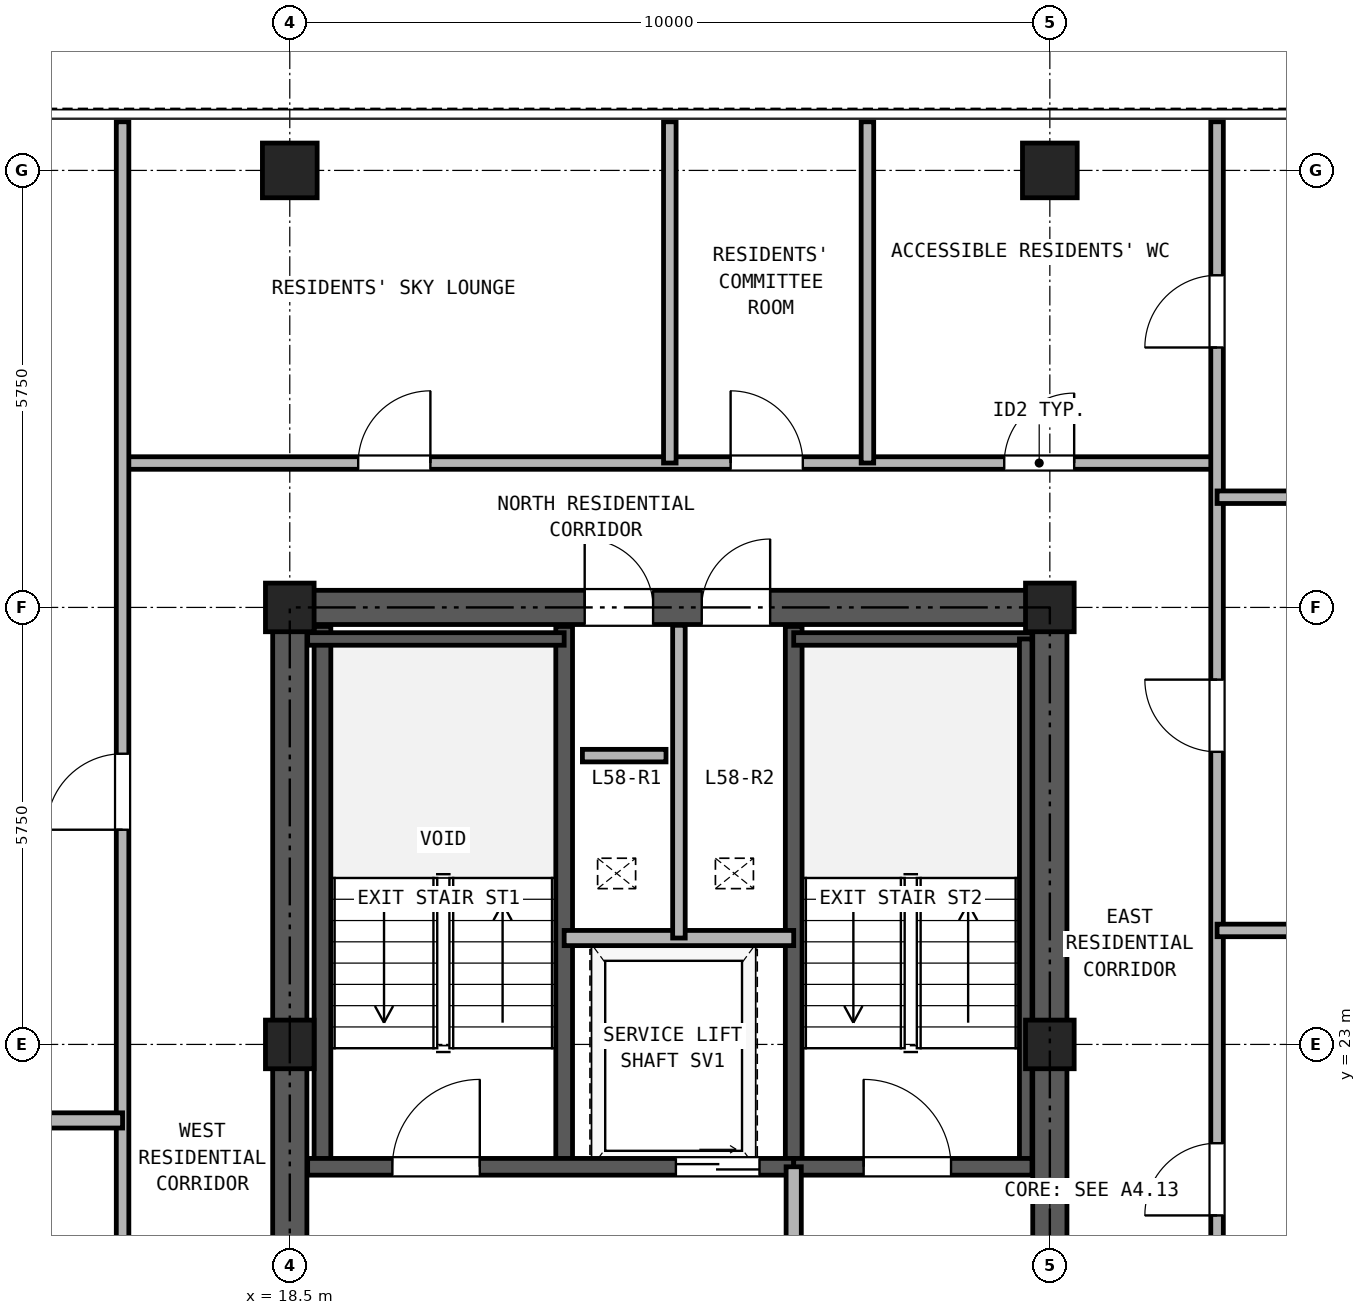
"""IFC4 building model, lengths in metres.
Left out: names, types, materials, properties, quantities, classifications, styles, units other than length and angle.
Written with IfcOpenShell. Run it as: python <this file> out.ifc"""

import sys

from ifc_helpers import new_model, si_unit, direction, frame, frame_2d, origin, origin_2d, place, context, subcontext, project, spatial, rectangle, hollow_rectangle, extrude, source, transform, mapped, element, fill, save


model = new_model("IFC4")
c1 = context("Model", 3, precision=1e-05, world=origin(), true_north=direction((0.0, 1.0)))
c2 = subcontext(c1, "Body", "Model", "MODEL_VIEW")
j1 = project(units=[si_unit("LENGTHUNIT", "METRE"), si_unit("PLANEANGLEUNIT", "RADIAN")], contexts=[c1])
p1 = place(None, origin())
s1 = spatial("IfcSite", under=j1, at=p1, CompositionType="ELEMENT")
p2 = place(p1, origin())
s2 = spatial("IfcBuilding", under=s1, at=p2, CompositionType="ELEMENT")
p3 = place(p2, frame((0.0, 0.0, 206.0)))
s3 = spatial("IfcBuildingStorey", under=s2, at=p3, CompositionType="ELEMENT", Elevation=206.0)
m1 = source(origin(), c2, "Body", "SweptSolid", [
    extrude(hollow_rectangle(XDim=0.72, YDim=0.72, WallThickness=0.04, at=origin_2d()), origin(), (0.0, 0.0, 1.0), 2.95),
])
for number, where, z_axis, x_axis in (
    (1, (18.5, 34.5, 0.0), (0.0, 0.0, 1.0), (1.0, 0.0, 0.0)),
    (2, (28.5, 34.5, 0.0), (0.0, 0.0, 1.0), (1.0, 0.0, 0.0)),
):
    element("IfcColumn", number, at=place(p3, frame(where, z_axis=z_axis, x_axis=x_axis)), inside=s3, PredefinedType="COLUMN", context=c2, shape_type="MappedRepresentation", body=[
        mapped(m1, transform((0.0, 0.0, 0.0), x_axis=(1.0, 0.0, 0.0), y_axis=(0.0, 1.0, 0.0), z_axis=(0.0, 0.0, 1.0), scale=1.0)),
    ])
m2 = source(origin(), c2, "Body", "SweptSolid", [
    extrude(hollow_rectangle(XDim=0.64, YDim=0.64, WallThickness=0.035, at=origin_2d()), origin(), (0.0, 0.0, 1.0), 2.95),
])
for number, where, z_axis, x_axis in (
    (3, (18.5, 23.0, 0.0), (0.0, 0.0, 1.0), (1.0, 0.0, 0.0)),
    (4, (18.5, 28.75, 0.0), (0.0, 0.0, 1.0), (1.0, 0.0, 0.0)),
    (5, (28.5, 23.0, 0.0), (0.0, 0.0, 1.0), (1.0, 0.0, 0.0)),
    (6, (28.5, 28.75, 0.0), (0.0, 0.0, 1.0), (1.0, 0.0, 0.0)),
):
    element("IfcColumn", number, at=place(p3, frame(where, z_axis=z_axis, x_axis=x_axis)), inside=s3, PredefinedType="COLUMN", context=c2, shape_type="MappedRepresentation", body=[
        mapped(m2, transform((0.0, 0.0, 0.0), x_axis=(1.0, 0.0, 0.0), y_axis=(0.0, 1.0, 0.0), z_axis=(0.0, 0.0, 1.0), scale=1.0)),
    ])
p4 = place(p3, frame((18.275, 28.75, 0.0), z_axis=(0.0, 0.0, 1.0), x_axis=(1.0, 0.0, 0.0)))
e7 = element("IfcWall", 7, at=p4, inside=s3, PredefinedType="SHEAR", context=c2, shape_type="SweptSolid", body=[
    extrude(rectangle(XDim=10.45, YDim=0.45, at=frame_2d((5.225, 0.0))), origin(), (0.0, 0.0, 1.0), 2.95),
])
p5 = place(p4, frame((4.105, 0.0, 0.0)))
e8 = element("IfcOpeningElement", 8, at=p5, cuts=e7, PredefinedType="OPENING", context=c2, shape_type="SweptSolid", body=[
    extrude(rectangle(XDim=0.9, YDim=2.05, at=frame_2d((0.45, 1.025))), frame((0.0, 0.235, 0.0), z_axis=(0.0, -1.0, 0.0), x_axis=(1.0, 0.0, 0.0)), (0.0, 0.0, 1.0), 0.47),
])
p6 = place(p4, frame((5.645, 0.0, 0.0)))
e9 = element("IfcOpeningElement", 9, at=p6, cuts=e7, PredefinedType="OPENING", context=c2, shape_type="SweptSolid", body=[
    extrude(rectangle(XDim=0.9, YDim=2.05, at=frame_2d((0.45, 1.025))), frame((0.0, 0.235, 0.0), z_axis=(0.0, -1.0, 0.0), x_axis=(1.0, 0.0, 0.0)), (0.0, 0.0, 1.0), 0.47),
])
p7 = place(p3, frame((18.5, 11.725, 0.0), z_axis=(0.0, 0.0, 1.0), x_axis=(0.0, 1.0, 0.0)))
e10 = element("IfcWall", 10, at=p7, inside=s3, PredefinedType="SHEAR", context=c2, shape_type="SweptSolid", body=[
    extrude(rectangle(XDim=16.8, YDim=0.45, at=frame_2d((8.4, 0.0))), origin(), (0.0, 0.0, 1.0), 2.95),
])
p8 = place(p7, frame((7.425, 0.0, 0.0)))
e11 = element("IfcOpeningElement", 11, at=p8, cuts=e10, PredefinedType="OPENING", context=c2, shape_type="SweptSolid", body=[
    extrude(rectangle(XDim=1.15, YDim=2.2, at=frame_2d((0.575, 1.1))), frame((0.0, 0.235, 0.0), z_axis=(0.0, -1.0, 0.0), x_axis=(1.0, 0.0, 0.0)), (0.0, 0.0, 1.0), 0.47),
])
p9 = place(p3, frame((28.5, 11.725, 0.0), z_axis=(0.0, 0.0, 1.0), x_axis=(0.0, 1.0, 0.0)))
e12 = element("IfcWall", 12, at=p9, inside=s3, PredefinedType="SHEAR", context=c2, shape_type="SweptSolid", body=[
    extrude(rectangle(XDim=16.8, YDim=0.45, at=frame_2d((8.4, 0.0))), origin(), (0.0, 0.0, 1.0), 2.95),
])
p10 = place(p9, frame((7.425, 0.0, 0.0)))
e13 = element("IfcOpeningElement", 13, at=p10, cuts=e12, PredefinedType="OPENING", context=c2, shape_type="SweptSolid", body=[
    extrude(rectangle(XDim=1.15, YDim=2.2, at=frame_2d((0.575, 1.1))), frame((0.0, 0.235, 0.0), z_axis=(0.0, -1.0, 0.0), x_axis=(1.0, 0.0, 0.0)), (0.0, 0.0, 1.0), 0.47),
])
for number, where, z_axis, x_axis in (
    (14, (18.93, 21.39, 0.0), (0.0, 0.0, 1.0), (0.0, 1.0, 0.0)),
    (15, (22.11, 21.39, 0.0), (0.0, 0.0, 1.0), (0.0, 1.0, 0.0)),
    (16, (25.13, 21.39, 0.0), (0.0, 0.0, 1.0), (0.0, 1.0, 0.0)),
):
    element("IfcWall", number, at=place(p3, frame(where, z_axis=z_axis, x_axis=x_axis)), inside=s3, PredefinedType="SOLIDWALL", context=c2, shape_type="SweptSolid", body=[
        extrude(rectangle(XDim=7.11, YDim=0.22, at=frame_2d((3.555, 0.0))), origin(), (0.0, 0.0, 1.0), 2.95),
    ])
p11 = place(p3, frame((18.735, 28.335, 0.0), z_axis=(0.0, 0.0, 1.0), x_axis=(1.0, 0.0, 0.0)))
e17 = element("IfcWall", 17, at=p11, inside=s3, PredefinedType="PARTITIONING", context=c2, shape_type="SweptSolid", body=[
    extrude(rectangle(XDim=3.375, YDim=0.165, at=frame_2d((1.688, 0.0))), origin(), (0.0, 0.0, 1.0), 2.95),
])
p12 = place(p3, frame((25.13, 28.335, 0.0), z_axis=(0.0, 0.0, 1.0), x_axis=(1.0, 0.0, 0.0)))
e18 = element("IfcWall", 18, at=p12, inside=s3, PredefinedType="PARTITIONING", context=c2, shape_type="SweptSolid", body=[
    extrude(rectangle(XDim=3.135, YDim=0.165, at=frame_2d((1.567, 0.0))), origin(), (0.0, 0.0, 1.0), 2.95),
])
p13 = place(p3, frame((28.183, 21.39, 0.0), z_axis=(0.0, 0.0, 1.0), x_axis=(0.0, 1.0, 0.0)))
e19 = element("IfcWall", 19, at=p13, inside=s3, PredefinedType="PARTITIONING", context=c2, shape_type="SweptSolid", body=[
    extrude(rectangle(XDim=6.945, YDim=0.165, at=frame_2d((3.473, 0.0))), origin(), (0.0, 0.0, 1.0), 2.95),
])
p14 = place(p3, frame((18.735, 21.39, 0.0), z_axis=(0.0, 0.0, 1.0), x_axis=(1.0, 0.0, 0.0)))
e20 = element("IfcWall", 20, at=p14, inside=s3, PredefinedType="SOLIDWALL", context=c2, shape_type="SweptSolid", body=[
    extrude(rectangle(XDim=6.395, YDim=0.22, at=frame_2d((3.197, 0.0))), origin(), (0.0, 0.0, 1.0), 2.95),
])
p15 = place(p14, frame((1.115, 0.0, 0.0)))
e21 = element("IfcOpeningElement", 21, at=p15, cuts=e20, PredefinedType="OPENING", context=c2, shape_type="SweptSolid", body=[
    extrude(rectangle(XDim=1.15, YDim=2.2, at=frame_2d((0.575, 1.1))), frame((0.0, 0.12, 0.0), z_axis=(0.0, -1.0, 0.0), x_axis=(1.0, 0.0, 0.0)), (0.0, 0.0, 1.0), 0.24),
])
p16 = place(p14, frame((4.845, 0.0, 0.0)))
e22 = element("IfcOpeningElement", 22, at=p16, cuts=e20, PredefinedType="OPENING", context=c2, shape_type="SweptSolid", body=[
    extrude(rectangle(XDim=1.1, YDim=2.25, at=frame_2d((0.55, 1.125))), frame((0.0, 0.12, 0.0), z_axis=(0.0, -1.0, 0.0), x_axis=(1.0, 0.0, 0.0)), (0.0, 0.0, 1.0), 0.24),
])
p17 = place(p3, frame((25.13, 21.39, 0.0), z_axis=(0.0, 0.0, 1.0), x_axis=(1.0, 0.0, 0.0)))
e23 = element("IfcWall", 23, at=p17, inside=s3, PredefinedType="SOLIDWALL", context=c2, shape_type="SweptSolid", body=[
    extrude(rectangle(XDim=3.135, YDim=0.22, at=frame_2d((1.567, 0.0))), origin(), (0.0, 0.0, 1.0), 2.95),
])
p18 = place(p17, frame((0.92, 0.0, 0.0)))
e24 = element("IfcOpeningElement", 24, at=p18, cuts=e23, PredefinedType="OPENING", context=c2, shape_type="SweptSolid", body=[
    extrude(rectangle(XDim=1.15, YDim=2.2, at=frame_2d((0.575, 1.1))), frame((0.0, 0.12, 0.0), z_axis=(0.0, -1.0, 0.0), x_axis=(1.0, 0.0, 0.0)), (0.0, 0.0, 1.0), 0.24),
])
p19 = place(p3, frame((22.11, 24.4, 0.0), z_axis=(0.0, 0.0, 1.0), x_axis=(1.0, 0.0, 0.0)))
e25 = element("IfcWall", 25, at=p19, inside=s3, PredefinedType="PARTITIONING", context=c2, shape_type="SweptSolid", body=[
    extrude(rectangle(XDim=3.02, YDim=0.2, at=frame_2d((1.51, 0.0))), origin(), (0.0, 0.0, 1.0), 2.95),
])
p20 = place(p3, frame((23.62, 24.4, 0.0), z_axis=(0.0, 0.0, 1.0), x_axis=(0.0, 1.0, 0.0)))
e26 = element("IfcWall", 26, at=p20, inside=s3, PredefinedType="PARTITIONING", context=c2, shape_type="SweptSolid", body=[
    extrude(rectangle(XDim=4.115, YDim=0.165, at=frame_2d((2.058, 0.0))), origin(), (0.0, 0.0, 1.0), 2.95),
])
p21 = place(p3, frame((25.13, 18.0, 0.0), z_axis=(0.0, 0.0, 1.0), x_axis=(0.0, 1.0, 0.0)))
e27 = element("IfcWall", 27, at=p21, inside=s3, PredefinedType="PARTITIONING", context=c2, shape_type="SweptSolid", body=[
    extrude(rectangle(XDim=3.39, YDim=0.2, at=frame_2d((1.695, 0.0))), origin(), (0.0, 0.0, 1.0), 2.95),
])
p22 = place(p21, frame((1.1, 0.0, 0.0)))
e28 = element("IfcOpeningElement", 28, at=p22, cuts=e27, PredefinedType="OPENING", context=c2, shape_type="SweptSolid", body=[
    extrude(rectangle(XDim=1.15, YDim=2.2, at=frame_2d((0.575, 1.1))), frame((0.0, 0.11, 0.0), z_axis=(0.0, -1.0, 0.0), x_axis=(1.0, 0.0, 0.0)), (0.0, 0.0, 1.0), 0.22),
])
p23 = place(p3, frame((16.3, 30.65, 0.0), z_axis=(0.0, 0.0, 1.0), x_axis=(1.0, 0.0, 0.0)))
e29 = element("IfcWall", 29, at=p23, inside=s3, PredefinedType="PARTITIONING", context=c2, shape_type="SweptSolid", body=[
    extrude(rectangle(XDim=14.4, YDim=0.165, at=frame_2d((7.2, 0.0))), origin(), (0.0, 0.0, 1.0), 2.95),
])
p24 = place(p23, frame((3.1, 0.0, 0.0)))
e30 = element("IfcOpeningElement", 30, at=p24, cuts=e29, PredefinedType="OPENING", context=c2, shape_type="SweptSolid", body=[
    extrude(rectangle(XDim=0.95, YDim=2.15, at=frame_2d((0.475, 1.075))), frame((0.0, 0.093, 0.0), z_axis=(0.0, -1.0, 0.0), x_axis=(1.0, 0.0, 0.0)), (0.0, 0.0, 1.0), 0.185),
])
p25 = place(p23, frame((8.0, 0.0, 0.0)))
e31 = element("IfcOpeningElement", 31, at=p25, cuts=e29, PredefinedType="OPENING", context=c2, shape_type="SweptSolid", body=[
    extrude(rectangle(XDim=0.95, YDim=2.15, at=frame_2d((0.475, 1.075))), frame((0.0, 0.093, 0.0), z_axis=(0.0, -1.0, 0.0), x_axis=(1.0, 0.0, 0.0)), (0.0, 0.0, 1.0), 0.185),
])
p26 = place(p23, frame((11.6, 0.0, 0.0)))
e32 = element("IfcOpeningElement", 32, at=p26, cuts=e29, PredefinedType="OPENING", context=c2, shape_type="SweptSolid", body=[
    extrude(rectangle(XDim=0.92, YDim=2.1, at=frame_2d((0.46, 1.05))), frame((0.0, 0.093, 0.0), z_axis=(0.0, -1.0, 0.0), x_axis=(1.0, 0.0, 0.0)), (0.0, 0.0, 1.0), 0.185),
])
p27 = place(p3, frame((16.3, 11.35, 0.0), z_axis=(0.0, 0.0, 1.0), x_axis=(0.0, 1.0, 0.0)))
e33 = element("IfcWall", 33, at=p27, inside=s3, PredefinedType="PARTITIONING", context=c2, shape_type="SweptSolid", body=[
    extrude(rectangle(XDim=23.79, YDim=0.165, at=frame_2d((11.895, 0.0))), origin(), (0.0, 0.0, 1.0), 2.95),
])
p28 = place(p27, frame((4.825, 0.0, 0.0)))
e34 = element("IfcOpeningElement", 34, at=p28, cuts=e33, PredefinedType="OPENING", context=c2, shape_type="SweptSolid", body=[
    extrude(rectangle(XDim=1.0, YDim=2.15, at=frame_2d((0.5, 1.075))), frame((0.0, 0.093, 0.0), z_axis=(0.0, -1.0, 0.0), x_axis=(1.0, 0.0, 0.0)), (0.0, 0.0, 1.0), 0.185),
])
p29 = place(p27, frame((14.475, 0.0, 0.0)))
e35 = element("IfcOpeningElement", 35, at=p29, cuts=e33, PredefinedType="OPENING", context=c2, shape_type="SweptSolid", body=[
    extrude(rectangle(XDim=1.0, YDim=2.15, at=frame_2d((0.5, 1.075))), frame((0.0, 0.093, 0.0), z_axis=(0.0, -1.0, 0.0), x_axis=(1.0, 0.0, 0.0)), (0.0, 0.0, 1.0), 0.185),
])
p30 = place(p3, frame((30.7, 11.35, 0.0), z_axis=(0.0, 0.0, 1.0), x_axis=(0.0, 1.0, 0.0)))
e36 = element("IfcWall", 36, at=p30, inside=s3, PredefinedType="PARTITIONING", context=c2, shape_type="SweptSolid", body=[
    extrude(rectangle(XDim=23.79, YDim=0.165, at=frame_2d((11.895, 0.0))), origin(), (0.0, 0.0, 1.0), 2.95),
])
p31 = place(p30, frame((2.825, 0.0, 0.0)))
e37 = element("IfcOpeningElement", 37, at=p31, cuts=e36, PredefinedType="OPENING", context=c2, shape_type="SweptSolid", body=[
    extrude(rectangle(XDim=0.95, YDim=2.15, at=frame_2d((0.475, 1.075))), frame((0.0, 0.093, 0.0), z_axis=(0.0, -1.0, 0.0), x_axis=(1.0, 0.0, 0.0)), (0.0, 0.0, 1.0), 0.185),
])
p32 = place(p30, frame((9.4, 0.0, 0.0)))
e38 = element("IfcOpeningElement", 38, at=p32, cuts=e36, PredefinedType="OPENING", context=c2, shape_type="SweptSolid", body=[
    extrude(rectangle(XDim=0.95, YDim=2.15, at=frame_2d((0.475, 1.075))), frame((0.0, 0.093, 0.0), z_axis=(0.0, -1.0, 0.0), x_axis=(1.0, 0.0, 0.0)), (0.0, 0.0, 1.0), 0.185),
])
p33 = place(p30, frame((15.5, 0.0, 0.0)))
e39 = element("IfcOpeningElement", 39, at=p33, cuts=e36, PredefinedType="OPENING", context=c2, shape_type="SweptSolid", body=[
    extrude(rectangle(XDim=0.95, YDim=2.15, at=frame_2d((0.475, 1.075))), frame((0.0, 0.093, 0.0), z_axis=(0.0, -1.0, 0.0), x_axis=(1.0, 0.0, 0.0)), (0.0, 0.0, 1.0), 0.185),
])
p34 = place(p30, frame((20.82, 0.0, 0.0)))
e40 = element("IfcOpeningElement", 40, at=p34, cuts=e36, PredefinedType="OPENING", context=c2, shape_type="SweptSolid", body=[
    extrude(rectangle(XDim=0.95, YDim=2.15, at=frame_2d((0.475, 1.075))), frame((0.0, 0.093, 0.0), z_axis=(0.0, -1.0, 0.0), x_axis=(1.0, 0.0, 0.0)), (0.0, 0.0, 1.0), 0.185),
])
p35 = place(p3, frame((0.16, 22.0, 0.0), z_axis=(0.0, 0.0, 1.0), x_axis=(1.0, 0.0, 0.0)))
e41 = element("IfcWall", 41, at=p35, inside=s3, PredefinedType="PARTITIONING", context=c2, shape_type="SweptSolid", body=[
    extrude(rectangle(XDim=16.14, YDim=0.2, at=frame_2d((8.07, 0.0))), origin(), (0.0, 0.0, 1.0), 2.95),
])
for number, where, z_axis, x_axis in (
    (42, (30.7, 24.5, 0.0), (0.0, 0.0, 1.0), (1.0, 0.0, 0.0)),
    (43, (30.7, 30.2, 0.0), (0.0, 0.0, 1.0), (1.0, 0.0, 0.0)),
):
    element("IfcWall", number, at=place(p3, frame(where, z_axis=z_axis, x_axis=x_axis)), inside=s3, PredefinedType="PARTITIONING", context=c2, shape_type="SweptSolid", body=[
        extrude(rectangle(XDim=10.94, YDim=0.165, at=frame_2d((5.47, 0.0))), origin(), (0.0, 0.0, 1.0), 2.95),
    ])
for number, where, z_axis, x_axis in (
    (44, (23.5, 30.65, 0.0), (0.0, 0.0, 1.0), (0.0, 1.0, 0.0)),
    (45, (26.1, 30.65, 0.0), (0.0, 0.0, 1.0), (0.0, 1.0, 0.0)),
):
    element("IfcWall", number, at=place(p3, frame(where, z_axis=z_axis, x_axis=x_axis)), inside=s3, PredefinedType="PARTITIONING", context=c2, shape_type="SweptSolid", body=[
        extrude(rectangle(XDim=4.49, YDim=0.165, at=frame_2d((2.245, 0.0))), origin(), (0.0, 0.0, 1.0), 2.95),
    ])
p36 = place(p3, frame((22.35, 26.8, 0.0), z_axis=(0.0, 0.0, 1.0), x_axis=(1.0, 0.0, 0.0)))
e46 = element("IfcWall", 46, at=p36, inside=s3, PredefinedType="PARTITIONING", context=c2, shape_type="SweptSolid", body=[
    extrude(rectangle(XDim=1.1, YDim=0.165, at=frame_2d((0.55, 0.0))), origin(), (0.0, 0.0, 1.0), 2.95),
])
p37 = place(p15, frame((1.15, 0.0, 0.0), z_axis=(0.0, 0.0, 1.0), x_axis=(-1.0, 0.0, 0.0)))
e47 = element("IfcDoor", 47, at=p37, inside=s3, OperationType="SINGLE_SWING_RIGHT", PredefinedType="DOOR", context=c2, shape_type="SweptSolid", body=[
    extrude(rectangle(XDim=1.15, YDim=2.2, at=frame_2d((0.575, 1.1))), frame((0.0, 0.025, 0.0), z_axis=(0.0, -1.0, 0.0), x_axis=(1.0, 0.0, 0.0)), (0.0, 0.0, 1.0), 0.05),
])
fill(e21, e47)
p38 = place(p18, frame((1.15, 0.0, 0.0), z_axis=(0.0, 0.0, 1.0), x_axis=(-1.0, 0.0, 0.0)))
e48 = element("IfcDoor", 48, at=p38, inside=s3, OperationType="SINGLE_SWING_LEFT", PredefinedType="DOOR", context=c2, shape_type="SweptSolid", body=[
    extrude(rectangle(XDim=1.15, YDim=2.2, at=frame_2d((0.575, 1.1))), frame((0.0, 0.025, 0.0), z_axis=(0.0, -1.0, 0.0), x_axis=(1.0, 0.0, 0.0)), (0.0, 0.0, 1.0), 0.05),
])
fill(e24, e48)
p39 = place(p16, frame((1.1, 0.0, 0.0), z_axis=(0.0, 0.0, 1.0), x_axis=(-1.0, 0.0, 0.0)))
e49 = element("IfcDoor", 49, at=p39, inside=s3, OperationType="DOUBLE_DOOR_SLIDING", PredefinedType="DOOR", context=c2, shape_type="SweptSolid", body=[
    extrude(rectangle(XDim=1.1, YDim=2.25, at=frame_2d((0.55, 1.125))), frame((0.0, 0.025, 0.0), z_axis=(0.0, -1.0, 0.0), x_axis=(1.0, 0.0, 0.0)), (0.0, 0.0, 1.0), 0.05),
])
fill(e22, e49)
p40 = place(p5, origin())
e50 = element("IfcDoor", 50, at=p40, inside=s3, OperationType="SINGLE_SWING_LEFT", PredefinedType="DOOR", context=c2, shape_type="SweptSolid", body=[
    extrude(rectangle(XDim=0.9, YDim=2.05, at=frame_2d((0.45, 1.025))), frame((0.0, 0.025, 0.0), z_axis=(0.0, -1.0, 0.0), x_axis=(1.0, 0.0, 0.0)), (0.0, 0.0, 1.0), 0.05),
])
fill(e8, e50)
p41 = place(p6, origin())
e51 = element("IfcDoor", 51, at=p41, inside=s3, OperationType="SINGLE_SWING_RIGHT", PredefinedType="DOOR", context=c2, shape_type="SweptSolid", body=[
    extrude(rectangle(XDim=0.9, YDim=2.05, at=frame_2d((0.45, 1.025))), frame((0.0, 0.025, 0.0), z_axis=(0.0, -1.0, 0.0), x_axis=(1.0, 0.0, 0.0)), (0.0, 0.0, 1.0), 0.05),
])
fill(e9, e51)
p42 = place(p29, origin())
e52 = element("IfcDoor", 52, at=p42, inside=s3, OperationType="SINGLE_SWING_LEFT", PredefinedType="DOOR", context=c2, shape_type="SweptSolid", body=[
    extrude(rectangle(XDim=1.0, YDim=2.15, at=frame_2d((0.5, 1.075))), frame((0.0, 0.025, 0.0), z_axis=(0.0, -1.0, 0.0), x_axis=(1.0, 0.0, 0.0)), (0.0, 0.0, 1.0), 0.05),
])
fill(e35, e52)
p43 = place(p32, origin())
e53 = element("IfcDoor", 53, at=p43, inside=s3, OperationType="SINGLE_SWING_LEFT", PredefinedType="DOOR", context=c2, shape_type="SweptSolid", body=[
    extrude(rectangle(XDim=0.95, YDim=2.15, at=frame_2d((0.475, 1.075))), frame((0.0, 0.025, 0.0), z_axis=(0.0, -1.0, 0.0), x_axis=(1.0, 0.0, 0.0)), (0.0, 0.0, 1.0), 0.05),
])
fill(e38, e53)
p44 = place(p33, origin())
e54 = element("IfcDoor", 54, at=p44, inside=s3, OperationType="SINGLE_SWING_RIGHT", PredefinedType="DOOR", context=c2, shape_type="SweptSolid", body=[
    extrude(rectangle(XDim=0.95, YDim=2.15, at=frame_2d((0.475, 1.075))), frame((0.0, 0.025, 0.0), z_axis=(0.0, -1.0, 0.0), x_axis=(1.0, 0.0, 0.0)), (0.0, 0.0, 1.0), 0.05),
])
fill(e39, e54)
p45 = place(p34, origin())
e55 = element("IfcDoor", 55, at=p45, inside=s3, OperationType="SINGLE_SWING_LEFT", PredefinedType="DOOR", context=c2, shape_type="SweptSolid", body=[
    extrude(rectangle(XDim=0.95, YDim=2.15, at=frame_2d((0.475, 1.075))), frame((0.0, 0.025, 0.0), z_axis=(0.0, -1.0, 0.0), x_axis=(1.0, 0.0, 0.0)), (0.0, 0.0, 1.0), 0.05),
])
fill(e40, e55)
p46 = place(p24, origin())
e56 = element("IfcDoor", 56, at=p46, inside=s3, OperationType="SINGLE_SWING_RIGHT", PredefinedType="DOOR", context=c2, shape_type="SweptSolid", body=[
    extrude(rectangle(XDim=0.95, YDim=2.15, at=frame_2d((0.475, 1.075))), frame((0.0, 0.025, 0.0), z_axis=(0.0, -1.0, 0.0), x_axis=(1.0, 0.0, 0.0)), (0.0, 0.0, 1.0), 0.05),
])
fill(e30, e56)
p47 = place(p25, origin())
e57 = element("IfcDoor", 57, at=p47, inside=s3, OperationType="SINGLE_SWING_LEFT", PredefinedType="DOOR", context=c2, shape_type="SweptSolid", body=[
    extrude(rectangle(XDim=0.95, YDim=2.15, at=frame_2d((0.475, 1.075))), frame((0.0, 0.025, 0.0), z_axis=(0.0, -1.0, 0.0), x_axis=(1.0, 0.0, 0.0)), (0.0, 0.0, 1.0), 0.05),
])
fill(e31, e57)
p48 = place(p26, origin())
e58 = element("IfcDoor", 58, at=p48, inside=s3, OperationType="SINGLE_SWING_RIGHT", PredefinedType="DOOR", context=c2, shape_type="SweptSolid", body=[
    extrude(rectangle(XDim=0.92, YDim=2.1, at=frame_2d((0.46, 1.05))), frame((0.0, 0.025, 0.0), z_axis=(0.0, -1.0, 0.0), x_axis=(1.0, 0.0, 0.0)), (0.0, 0.0, 1.0), 0.05),
])
fill(e32, e58)
save(model, sys.argv[1])
